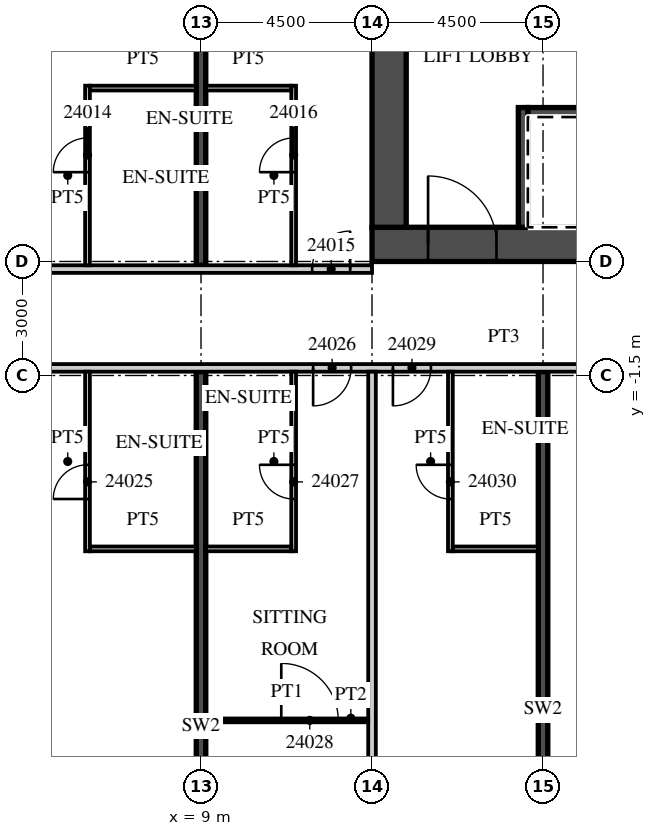
"""IFC4 building model, lengths in metres.
Left out: names, types, materials, properties, quantities, classifications, styles, units other than length and angle.
Written with IfcOpenShell. Run it as: python <this file> out.ifc"""

import sys

from ifc_helpers import new_model, si_unit, direction, frame, frame_2d, origin, place, context, subcontext, project, spatial, rectangle, extrude, element, fill, save


model = new_model("IFC4")
c1 = context("Model", 3, precision=1e-05, world=origin(), true_north=direction((0.0, 1.0)))
c2 = subcontext(c1, "Body", "Model", "MODEL_VIEW")
j1 = project(units=[si_unit("LENGTHUNIT", "METRE"), si_unit("PLANEANGLEUNIT", "RADIAN")], contexts=[c1])
p1 = place(None, origin())
s1 = spatial("IfcSite", under=j1, at=p1, CompositionType="ELEMENT")
p2 = place(p1, origin())
s2 = spatial("IfcBuilding", under=s1, at=p2, CompositionType="ELEMENT")
p3 = place(p2, frame((0.0, 0.0, 114.1)))
s3 = spatial("IfcBuildingStorey", under=s2, at=p3, CompositionType="ELEMENT", Elevation=114.1)
p4 = place(p3, frame((9.0, -20.044, 0.0), z_axis=(0.0, 0.0, 1.0), x_axis=(0.0, 1.0, 0.0)))
e1 = element("IfcWall", 1, at=p4, inside=s3, PredefinedType="SHEAR", context=c2, shape_type="SweptSolid", body=[
    extrude(rectangle(XDim=18.644, YDim=0.25, at=frame_2d((9.322, 0.0))), origin(), (0.0, 0.0, 1.0), 3.3),
])
p5 = place(p3, frame((9.0, 1.4, 0.0), z_axis=(0.0, 0.0, 1.0), x_axis=(0.0, 1.0, 0.0)))
e2 = element("IfcWall", 2, at=p5, inside=s3, PredefinedType="SHEAR", context=c2, shape_type="SweptSolid", body=[
    extrude(rectangle(XDim=20.807, YDim=0.25, at=frame_2d((10.403, 0.0))), origin(), (0.0, 0.0, 1.0), 3.3),
])
p6 = place(p3, frame((18.0, -19.177, 0.0), z_axis=(0.0, 0.0, 1.0), x_axis=(0.0, 1.0, 0.0)))
e3 = element("IfcWall", 3, at=p6, inside=s3, PredefinedType="SHEAR", context=c2, shape_type="SweptSolid", body=[
    extrude(rectangle(XDim=17.777, YDim=0.25, at=frame_2d((8.889, 0.0))), origin(), (0.0, 0.0, 1.0), 3.3),
])
p7 = place(p3, frame((-39.316, 1.3, 0.0), z_axis=(0.0, 0.0, 1.0), x_axis=(1.0, 0.0, 0.0)))
e4 = element("IfcWall", 4, at=p7, inside=s3, PredefinedType="PARTITIONING", context=c2, shape_type="SweptSolid", body=[
    extrude(rectangle(XDim=52.816, YDim=0.2, at=frame_2d((26.408, 0.0))), origin(), (0.0, 0.0, 1.0), 3.02),
])
p8 = place(p7, frame((0.15, 0.0, 0.0)))
e5 = element("IfcOpeningElement", 5, at=p8, cuts=e4, PredefinedType="OPENING", context=c2, shape_type="SweptSolid", body=[
    extrude(rectangle(XDim=0.9, YDim=2.1, at=frame_2d((0.45, 1.05))), frame((0.0, 0.11, 0.0), z_axis=(0.0, -1.0, 0.0), x_axis=(1.0, 0.0, 0.0)), (0.0, 0.0, 1.0), 0.22),
])
p9 = place(p7, frame((6.266, 0.0, 0.0)))
e6 = element("IfcOpeningElement", 6, at=p9, cuts=e4, PredefinedType="OPENING", context=c2, shape_type="SweptSolid", body=[
    extrude(rectangle(XDim=1.0, YDim=2.1, at=frame_2d((0.5, 1.05))), frame((0.0, 0.11, 0.0), z_axis=(0.0, -1.0, 0.0), x_axis=(1.0, 0.0, 0.0)), (0.0, 0.0, 1.0), 0.22),
])
p10 = place(p7, frame((10.741, 0.0, 0.0)))
e7 = element("IfcOpeningElement", 7, at=p10, cuts=e4, PredefinedType="OPENING", context=c2, shape_type="SweptSolid", body=[
    extrude(rectangle(XDim=1.0, YDim=2.1, at=frame_2d((0.5, 1.05))), frame((0.0, 0.11, 0.0), z_axis=(0.0, -1.0, 0.0), x_axis=(1.0, 0.0, 0.0)), (0.0, 0.0, 1.0), 0.22),
])
p11 = place(p7, frame((17.678, 0.0, 0.0)))
e8 = element("IfcOpeningElement", 8, at=p11, cuts=e4, PredefinedType="OPENING", context=c2, shape_type="SweptSolid", body=[
    extrude(rectangle(XDim=1.2, YDim=2.1, at=frame_2d((0.6, 1.05))), frame((0.0, 0.11, 0.0), z_axis=(0.0, -1.0, 0.0), x_axis=(1.0, 0.0, 0.0)), (0.0, 0.0, 1.0), 0.22),
])
p12 = place(p7, frame((26.678, 0.0, 0.0)))
e9 = element("IfcOpeningElement", 9, at=p12, cuts=e4, PredefinedType="OPENING", context=c2, shape_type="SweptSolid", body=[
    extrude(rectangle(XDim=1.2, YDim=2.1, at=frame_2d((0.6, 1.05))), frame((0.0, 0.11, 0.0), z_axis=(0.0, -1.0, 0.0), x_axis=(1.0, 0.0, 0.0)), (0.0, 0.0, 1.0), 0.22),
])
p13 = place(p7, frame((35.678, 0.0, 0.0)))
e10 = element("IfcOpeningElement", 10, at=p13, cuts=e4, PredefinedType="OPENING", context=c2, shape_type="SweptSolid", body=[
    extrude(rectangle(XDim=1.2, YDim=2.1, at=frame_2d((0.6, 1.05))), frame((0.0, 0.11, 0.0), z_axis=(0.0, -1.0, 0.0), x_axis=(1.0, 0.0, 0.0)), (0.0, 0.0, 1.0), 0.22),
])
p14 = place(p7, frame((41.754, 0.0, 0.0)))
e11 = element("IfcOpeningElement", 11, at=p14, cuts=e4, PredefinedType="OPENING", context=c2, shape_type="SweptSolid", body=[
    extrude(rectangle(XDim=1.2, YDim=2.1, at=frame_2d((0.6, 1.05))), frame((0.0, 0.11, 0.0), z_axis=(0.0, -1.0, 0.0), x_axis=(1.0, 0.0, 0.0)), (0.0, 0.0, 1.0), 0.22),
])
p15 = place(p7, frame((51.241, 0.0, 0.0)))
e12 = element("IfcOpeningElement", 12, at=p15, cuts=e4, PredefinedType="OPENING", context=c2, shape_type="SweptSolid", body=[
    extrude(rectangle(XDim=1.0, YDim=2.1, at=frame_2d((0.5, 1.05))), frame((0.0, 0.11, 0.0), z_axis=(0.0, -1.0, 0.0), x_axis=(1.0, 0.0, 0.0)), (0.0, 0.0, 1.0), 0.22),
])
p16 = place(p3, frame((6.013, 1.4, 0.0), z_axis=(0.0, 0.0, 1.0), x_axis=(0.0, 1.0, 0.0)))
e13 = element("IfcWall", 13, at=p16, inside=s3, PredefinedType="PARTITIONING", context=c2, shape_type="SweptSolid", body=[
    extrude(rectangle(XDim=4.725, YDim=0.125, at=frame_2d((2.363, 0.0))), origin(), (0.0, 0.0, 1.0), 3.02),
])
p17 = place(p16, frame((2.45, 0.0, 0.0)))
e14 = element("IfcOpeningElement", 14, at=p17, cuts=e13, PredefinedType="OPENING", context=c2, shape_type="SweptSolid", body=[
    extrude(rectangle(XDim=0.9, YDim=2.1, at=frame_2d((0.45, 1.05))), frame((0.0, 0.073, 0.0), z_axis=(0.0, -1.0, 0.0), x_axis=(1.0, 0.0, 0.0)), (0.0, 0.0, 1.0), 0.145),
])
p18 = place(p3, frame((6.075, 6.062, 0.0), z_axis=(0.0, 0.0, 1.0), x_axis=(1.0, 0.0, 0.0)))
e15 = element("IfcWall", 15, at=p18, inside=s3, PredefinedType="PARTITIONING", context=c2, shape_type="SweptSolid", body=[
    extrude(rectangle(XDim=2.8, YDim=0.125, at=frame_2d((1.4, 0.0))), origin(), (0.0, 0.0, 1.0), 3.02),
])
p19 = place(p3, frame((11.438, 1.4, 0.0), z_axis=(0.0, 0.0, 1.0), x_axis=(0.0, 1.0, 0.0)))
e16 = element("IfcWall", 16, at=p19, inside=s3, PredefinedType="PARTITIONING", context=c2, shape_type="SweptSolid", body=[
    extrude(rectangle(XDim=4.725, YDim=0.125, at=frame_2d((2.363, 0.0))), origin(), (0.0, 0.0, 1.0), 3.02),
])
p20 = place(p19, frame((2.45, 0.0, 0.0)))
e17 = element("IfcOpeningElement", 17, at=p20, cuts=e16, PredefinedType="OPENING", context=c2, shape_type="SweptSolid", body=[
    extrude(rectangle(XDim=0.9, YDim=2.1, at=frame_2d((0.45, 1.05))), frame((0.0, 0.073, 0.0), z_axis=(0.0, -1.0, 0.0), x_axis=(1.0, 0.0, 0.0)), (0.0, 0.0, 1.0), 0.145),
])
p21 = place(p3, frame((9.125, 6.062, 0.0), z_axis=(0.0, 0.0, 1.0), x_axis=(1.0, 0.0, 0.0)))
e18 = element("IfcWall", 18, at=p21, inside=s3, PredefinedType="PARTITIONING", context=c2, shape_type="SweptSolid", body=[
    extrude(rectangle(XDim=2.25, YDim=0.125, at=frame_2d((1.125, 0.0))), origin(), (0.0, 0.0, 1.0), 3.02),
])
p22 = place(p3, frame((-13.5, -1.3, 0.0), z_axis=(0.0, 0.0, 1.0), x_axis=(1.0, 0.0, 0.0)))
e19 = element("IfcWall", 19, at=p22, inside=s3, PredefinedType="PARTITIONING", context=c2, shape_type="SweptSolid", body=[
    extrude(rectangle(XDim=60.932, YDim=0.2, at=frame_2d((30.466, 0.0))), origin(), (0.0, 0.0, 1.0), 3.02),
])
p23 = place(p22, frame((0.575, 0.0, 0.0)))
e20 = element("IfcOpeningElement", 20, at=p23, cuts=e19, PredefinedType="OPENING", context=c2, shape_type="SweptSolid", body=[
    extrude(rectangle(XDim=1.0, YDim=2.1, at=frame_2d((0.5, 1.05))), frame((0.0, 0.11, 0.0), z_axis=(0.0, -1.0, 0.0), x_axis=(1.0, 0.0, 0.0)), (0.0, 0.0, 1.0), 0.22),
])
p24 = place(p22, frame((5.075, 0.0, 0.0)))
e21 = element("IfcOpeningElement", 21, at=p24, cuts=e19, PredefinedType="OPENING", context=c2, shape_type="SweptSolid", body=[
    extrude(rectangle(XDim=1.0, YDim=2.1, at=frame_2d((0.5, 1.05))), frame((0.0, 0.11, 0.0), z_axis=(0.0, -1.0, 0.0), x_axis=(1.0, 0.0, 0.0)), (0.0, 0.0, 1.0), 0.22),
])
p25 = place(p22, frame((11.925, 0.0, 0.0)))
e22 = element("IfcOpeningElement", 22, at=p25, cuts=e19, PredefinedType="OPENING", context=c2, shape_type="SweptSolid", body=[
    extrude(rectangle(XDim=1.0, YDim=2.1, at=frame_2d((0.5, 1.05))), frame((0.0, 0.11, 0.0), z_axis=(0.0, -1.0, 0.0), x_axis=(1.0, 0.0, 0.0)), (0.0, 0.0, 1.0), 0.22),
])
p26 = place(p22, frame((15.938, 0.0, 0.0)))
e23 = element("IfcOpeningElement", 23, at=p26, cuts=e19, PredefinedType="OPENING", context=c2, shape_type="SweptSolid", body=[
    extrude(rectangle(XDim=1.2, YDim=2.1, at=frame_2d((0.6, 1.05))), frame((0.0, 0.11, 0.0), z_axis=(0.0, -1.0, 0.0), x_axis=(1.0, 0.0, 0.0)), (0.0, 0.0, 1.0), 0.22),
])
p27 = place(p22, frame((25.45, 0.0, 0.0)))
e24 = element("IfcOpeningElement", 24, at=p27, cuts=e19, PredefinedType="OPENING", context=c2, shape_type="SweptSolid", body=[
    extrude(rectangle(XDim=1.0, YDim=2.1, at=frame_2d((0.5, 1.05))), frame((0.0, 0.11, 0.0), z_axis=(0.0, -1.0, 0.0), x_axis=(1.0, 0.0, 0.0)), (0.0, 0.0, 1.0), 0.22),
])
p28 = place(p22, frame((27.55, 0.0, 0.0)))
e25 = element("IfcOpeningElement", 25, at=p28, cuts=e19, PredefinedType="OPENING", context=c2, shape_type="SweptSolid", body=[
    extrude(rectangle(XDim=1.0, YDim=2.1, at=frame_2d((0.5, 1.05))), frame((0.0, 0.11, 0.0), z_axis=(0.0, -1.0, 0.0), x_axis=(1.0, 0.0, 0.0)), (0.0, 0.0, 1.0), 0.22),
])
p29 = place(p22, frame((33.938, 0.0, 0.0)))
e26 = element("IfcOpeningElement", 26, at=p29, cuts=e19, PredefinedType="OPENING", context=c2, shape_type="SweptSolid", body=[
    extrude(rectangle(XDim=1.2, YDim=2.1, at=frame_2d((0.6, 1.05))), frame((0.0, 0.11, 0.0), z_axis=(0.0, -1.0, 0.0), x_axis=(1.0, 0.0, 0.0)), (0.0, 0.0, 1.0), 0.22),
])
p30 = place(p22, frame((45.862, 0.0, 0.0)))
e27 = element("IfcOpeningElement", 27, at=p30, cuts=e19, PredefinedType="OPENING", context=c2, shape_type="SweptSolid", body=[
    extrude(rectangle(XDim=1.2, YDim=2.1, at=frame_2d((0.6, 1.05))), frame((0.0, 0.11, 0.0), z_axis=(0.0, -1.0, 0.0), x_axis=(1.0, 0.0, 0.0)), (0.0, 0.0, 1.0), 0.22),
])
p31 = place(p22, frame((52.425, 0.0, 0.0)))
e28 = element("IfcOpeningElement", 28, at=p31, cuts=e19, PredefinedType="OPENING", context=c2, shape_type="SweptSolid", body=[
    extrude(rectangle(XDim=1.0, YDim=2.1, at=frame_2d((0.5, 1.05))), frame((0.0, 0.11, 0.0), z_axis=(0.0, -1.0, 0.0), x_axis=(1.0, 0.0, 0.0)), (0.0, 0.0, 1.0), 0.22),
])
p32 = place(p22, frame((56.95, 0.0, 0.0)))
e29 = element("IfcOpeningElement", 29, at=p32, cuts=e19, PredefinedType="OPENING", context=c2, shape_type="SweptSolid", body=[
    extrude(rectangle(XDim=1.0, YDim=2.1, at=frame_2d((0.5, 1.05))), frame((0.0, 0.11, 0.0), z_axis=(0.0, -1.0, 0.0), x_axis=(1.0, 0.0, 0.0)), (0.0, 0.0, 1.0), 0.22),
])
p33 = place(p22, frame((59.882, 0.0, 0.0)))
e30 = element("IfcOpeningElement", 30, at=p33, cuts=e19, PredefinedType="OPENING", context=c2, shape_type="SweptSolid", body=[
    extrude(rectangle(XDim=0.9, YDim=2.1, at=frame_2d((0.45, 1.05))), frame((0.0, 0.11, 0.0), z_axis=(0.0, -1.0, 0.0), x_axis=(1.0, 0.0, 0.0)), (0.0, 0.0, 1.0), 0.22),
])
p34 = place(p3, frame((6.013, -6.125, 0.0), z_axis=(0.0, 0.0, 1.0), x_axis=(0.0, 1.0, 0.0)))
e31 = element("IfcWall", 31, at=p34, inside=s3, PredefinedType="PARTITIONING", context=c2, shape_type="SweptSolid", body=[
    extrude(rectangle(XDim=4.725, YDim=0.125, at=frame_2d((2.363, 0.0))), origin(), (0.0, 0.0, 1.0), 3.02),
])
p35 = place(p34, frame((1.375, 0.0, 0.0)))
e32 = element("IfcOpeningElement", 32, at=p35, cuts=e31, PredefinedType="OPENING", context=c2, shape_type="SweptSolid", body=[
    extrude(rectangle(XDim=0.9, YDim=2.1, at=frame_2d((0.45, 1.05))), frame((0.0, 0.073, 0.0), z_axis=(0.0, -1.0, 0.0), x_axis=(1.0, 0.0, 0.0)), (0.0, 0.0, 1.0), 0.145),
])
p36 = place(p3, frame((6.075, -6.062, 0.0), z_axis=(0.0, 0.0, 1.0), x_axis=(1.0, 0.0, 0.0)))
e33 = element("IfcWall", 33, at=p36, inside=s3, PredefinedType="PARTITIONING", context=c2, shape_type="SweptSolid", body=[
    extrude(rectangle(XDim=2.8, YDim=0.125, at=frame_2d((1.4, 0.0))), origin(), (0.0, 0.0, 1.0), 3.02),
])
p37 = place(p3, frame((13.5, -19.633, 0.0), z_axis=(0.0, 0.0, 1.0), x_axis=(0.0, 1.0, 0.0)))
e34 = element("IfcWall", 34, at=p37, inside=s3, PredefinedType="PARTITIONING", context=c2, shape_type="SweptSolid", body=[
    extrude(rectangle(XDim=18.233, YDim=0.2, at=frame_2d((9.117, 0.0))), origin(), (0.0, 0.0, 1.0), 3.02),
])
p38 = place(p3, frame((11.438, -6.125, 0.0), z_axis=(0.0, 0.0, 1.0), x_axis=(0.0, 1.0, 0.0)))
e35 = element("IfcWall", 35, at=p38, inside=s3, PredefinedType="PARTITIONING", context=c2, shape_type="SweptSolid", body=[
    extrude(rectangle(XDim=4.725, YDim=0.125, at=frame_2d((2.363, 0.0))), origin(), (0.0, 0.0, 1.0), 3.02),
])
p39 = place(p38, frame((1.375, 0.0, 0.0)))
e36 = element("IfcOpeningElement", 36, at=p39, cuts=e35, PredefinedType="OPENING", context=c2, shape_type="SweptSolid", body=[
    extrude(rectangle(XDim=0.9, YDim=2.1, at=frame_2d((0.45, 1.05))), frame((0.0, 0.073, 0.0), z_axis=(0.0, -1.0, 0.0), x_axis=(1.0, 0.0, 0.0)), (0.0, 0.0, 1.0), 0.145),
])
p40 = place(p3, frame((9.125, -6.062, 0.0), z_axis=(0.0, 0.0, 1.0), x_axis=(1.0, 0.0, 0.0)))
e37 = element("IfcWall", 37, at=p40, inside=s3, PredefinedType="PARTITIONING", context=c2, shape_type="SweptSolid", body=[
    extrude(rectangle(XDim=2.25, YDim=0.125, at=frame_2d((1.125, 0.0))), origin(), (0.0, 0.0, 1.0), 3.02),
])
p41 = place(p3, frame((9.125, -10.575, 0.0), z_axis=(0.0, 0.0, 1.0), x_axis=(1.0, 0.0, 0.0)))
e38 = element("IfcWall", 38, at=p41, inside=s3, PredefinedType="PARTITIONING", context=c2, shape_type="SweptSolid", body=[
    extrude(rectangle(XDim=4.275, YDim=0.1, at=frame_2d((2.137, 0.0))), origin(), (0.0, 0.0, 1.0), 3.02),
])
p42 = place(p41, frame((1.987, 0.0, 0.0)))
e39 = element("IfcOpeningElement", 39, at=p42, cuts=e38, PredefinedType="OPENING", context=c2, shape_type="SweptSolid", body=[
    extrude(rectangle(XDim=1.5, YDim=2.1, at=frame_2d((0.75, 1.05))), frame((0.0, 0.06, 0.0), z_axis=(0.0, -1.0, 0.0), x_axis=(1.0, 0.0, 0.0)), (0.0, 0.0, 1.0), 0.12),
])
p43 = place(p3, frame((15.562, -6.125, 0.0), z_axis=(0.0, 0.0, 1.0), x_axis=(0.0, 1.0, 0.0)))
e40 = element("IfcWall", 40, at=p43, inside=s3, PredefinedType="PARTITIONING", context=c2, shape_type="SweptSolid", body=[
    extrude(rectangle(XDim=4.725, YDim=0.125, at=frame_2d((2.363, 0.0))), origin(), (0.0, 0.0, 1.0), 3.02),
])
p44 = place(p43, frame((1.375, 0.0, 0.0)))
e41 = element("IfcOpeningElement", 41, at=p44, cuts=e40, PredefinedType="OPENING", context=c2, shape_type="SweptSolid", body=[
    extrude(rectangle(XDim=0.9, YDim=2.1, at=frame_2d((0.45, 1.05))), frame((0.0, 0.073, 0.0), z_axis=(0.0, -1.0, 0.0), x_axis=(1.0, 0.0, 0.0)), (0.0, 0.0, 1.0), 0.145),
])
p45 = place(p3, frame((15.625, -6.062, 0.0), z_axis=(0.0, 0.0, 1.0), x_axis=(1.0, 0.0, 0.0)))
e42 = element("IfcWall", 42, at=p45, inside=s3, PredefinedType="PARTITIONING", context=c2, shape_type="SweptSolid", body=[
    extrude(rectangle(XDim=2.25, YDim=0.125, at=frame_2d((1.125, 0.0))), origin(), (0.0, 0.0, 1.0), 3.02),
])
p46 = place(p3, frame((13.5, 1.95, 0.0), z_axis=(0.0, 0.0, 1.0), x_axis=(1.0, 0.0, 0.0)))
e43 = element("IfcWall", 43, at=p46, inside=s3, PredefinedType="SHEAR", context=c2, shape_type="SweptSolid", body=[
    extrude(rectangle(XDim=18.0, YDim=0.9, at=frame_2d((9.0, 0.0))), origin(), (0.0, 0.0, 1.0), 3.02),
])
p47 = place(p46, frame((1.475, 0.0, 0.0)))
e44 = element("IfcOpeningElement", 44, at=p47, cuts=e43, PredefinedType="OPENING", context=c2, shape_type="SweptSolid", body=[
    extrude(rectangle(XDim=1.8, YDim=2.1, at=frame_2d((0.9, 1.05))), frame((0.0, 0.46, 0.0), z_axis=(0.0, -1.0, 0.0), x_axis=(1.0, 0.0, 0.0)), (0.0, 0.0, 1.0), 0.92),
])
p48 = place(p3, frame((13.95, 2.4, 0.0), z_axis=(0.0, 0.0, 1.0), x_axis=(0.0, 1.0, 0.0)))
e45 = element("IfcWall", 45, at=p48, inside=s3, PredefinedType="SHEAR", context=c2, shape_type="SweptSolid", body=[
    extrude(rectangle(XDim=12.2, YDim=0.9, at=frame_2d((6.1, 0.0))), origin(), (0.0, 0.0, 1.0), 3.02),
])
p49 = place(p3, frame((17.6, 5.425, 0.0), z_axis=(0.0, 0.0, 1.0), x_axis=(1.0, 0.0, 0.0)))
e46 = element("IfcWall", 46, at=p49, inside=s3, PredefinedType="SHEAR", context=c2, shape_type="SweptSolid", body=[
    extrude(rectangle(XDim=13.0, YDim=0.25, at=frame_2d((6.5, 0.0))), origin(), (0.0, 0.0, 1.0), 3.02),
])
p50 = place(p3, frame((17.475, 2.4, 0.0), z_axis=(0.0, 0.0, 1.0), x_axis=(0.0, 1.0, 0.0)))
e47 = element("IfcWall", 47, at=p50, inside=s3, PredefinedType="SHEAR", context=c2, shape_type="SweptSolid", body=[
    extrude(rectangle(XDim=3.15, YDim=0.25, at=frame_2d((1.575, 0.0))), origin(), (0.0, 0.0, 1.0), 3.02),
])
p51 = place(p17, origin())
e48 = element("IfcDoor", 48, at=p51, inside=s3, OperationType="SINGLE_SWING_LEFT", PredefinedType="DOOR", context=c2, shape_type="SweptSolid", body=[
    extrude(rectangle(XDim=0.9, YDim=2.1, at=frame_2d((0.45, 1.05))), frame((0.0, 0.025, 0.0), z_axis=(0.0, -1.0, 0.0), x_axis=(1.0, 0.0, 0.0)), (0.0, 0.0, 1.0), 0.05),
])
fill(e14, e48)
p52 = place(p15, origin())
e49 = element("IfcDoor", 49, at=p52, inside=s3, OperationType="SINGLE_SWING_RIGHT", PredefinedType="DOOR", context=c2, shape_type="SweptSolid", body=[
    extrude(rectangle(XDim=1.0, YDim=2.1, at=frame_2d((0.5, 1.05))), frame((0.0, 0.025, 0.0), z_axis=(0.0, -1.0, 0.0), x_axis=(1.0, 0.0, 0.0)), (0.0, 0.0, 1.0), 0.05),
])
fill(e12, e49)
p53 = place(p20, origin())
e50 = element("IfcDoor", 50, at=p53, inside=s3, OperationType="SINGLE_SWING_LEFT", PredefinedType="DOOR", context=c2, shape_type="SweptSolid", body=[
    extrude(rectangle(XDim=0.9, YDim=2.1, at=frame_2d((0.45, 1.05))), frame((0.0, 0.025, 0.0), z_axis=(0.0, -1.0, 0.0), x_axis=(1.0, 0.0, 0.0)), (0.0, 0.0, 1.0), 0.05),
])
fill(e17, e50)
p54 = place(p35, origin())
e51 = element("IfcDoor", 51, at=p54, inside=s3, OperationType="SINGLE_SWING_LEFT", PredefinedType="DOOR", context=c2, shape_type="SweptSolid", body=[
    extrude(rectangle(XDim=0.9, YDim=2.1, at=frame_2d((0.45, 1.05))), frame((0.0, 0.025, 0.0), z_axis=(0.0, -1.0, 0.0), x_axis=(1.0, 0.0, 0.0)), (0.0, 0.0, 1.0), 0.05),
])
fill(e32, e51)
p55 = place(p27, origin())
e52 = element("IfcDoor", 52, at=p55, inside=s3, OperationType="SINGLE_SWING_LEFT", PredefinedType="DOOR", context=c2, shape_type="SweptSolid", body=[
    extrude(rectangle(XDim=1.0, YDim=2.1, at=frame_2d((0.5, 1.05))), frame((0.0, 0.025, 0.0), z_axis=(0.0, -1.0, 0.0), x_axis=(1.0, 0.0, 0.0)), (0.0, 0.0, 1.0), 0.05),
])
fill(e24, e52)
p56 = place(p39, origin())
e53 = element("IfcDoor", 53, at=p56, inside=s3, OperationType="SINGLE_SWING_RIGHT", PredefinedType="DOOR", context=c2, shape_type="SweptSolid", body=[
    extrude(rectangle(XDim=0.9, YDim=2.1, at=frame_2d((0.45, 1.05))), frame((0.0, 0.025, 0.0), z_axis=(0.0, -1.0, 0.0), x_axis=(1.0, 0.0, 0.0)), (0.0, 0.0, 1.0), 0.05),
])
fill(e36, e53)
p57 = place(p42, origin())
e54 = element("IfcDoor", 54, at=p57, inside=s3, OperationType="SINGLE_SWING_LEFT", PredefinedType="DOOR", context=c2, shape_type="SweptSolid", body=[
    extrude(rectangle(XDim=1.5, YDim=2.1, at=frame_2d((0.75, 1.05))), frame((0.0, 0.025, 0.0), z_axis=(0.0, -1.0, 0.0), x_axis=(1.0, 0.0, 0.0)), (0.0, 0.0, 1.0), 0.05),
])
fill(e39, e54)
p58 = place(p28, origin())
e55 = element("IfcDoor", 55, at=p58, inside=s3, OperationType="SINGLE_SWING_LEFT", PredefinedType="DOOR", context=c2, shape_type="SweptSolid", body=[
    extrude(rectangle(XDim=1.0, YDim=2.1, at=frame_2d((0.5, 1.05))), frame((0.0, 0.025, 0.0), z_axis=(0.0, -1.0, 0.0), x_axis=(1.0, 0.0, 0.0)), (0.0, 0.0, 1.0), 0.05),
])
fill(e25, e55)
p59 = place(p44, origin())
e56 = element("IfcDoor", 56, at=p59, inside=s3, OperationType="SINGLE_SWING_RIGHT", PredefinedType="DOOR", context=c2, shape_type="SweptSolid", body=[
    extrude(rectangle(XDim=0.9, YDim=2.1, at=frame_2d((0.45, 1.05))), frame((0.0, 0.025, 0.0), z_axis=(0.0, -1.0, 0.0), x_axis=(1.0, 0.0, 0.0)), (0.0, 0.0, 1.0), 0.05),
])
fill(e41, e56)
p60 = place(p47, origin())
e57 = element("IfcDoor", 57, at=p60, inside=s3, OperationType="DOUBLE_DOOR_DOUBLE_SWING", PredefinedType="DOOR", context=c2, shape_type="SweptSolid", body=[
    extrude(rectangle(XDim=1.8, YDim=2.1, at=frame_2d((0.9, 1.05))), frame((0.0, 0.025, 0.0), z_axis=(0.0, -1.0, 0.0), x_axis=(1.0, 0.0, 0.0)), (0.0, 0.0, 1.0), 0.05),
])
fill(e44, e57)
save(model, sys.argv[1])
